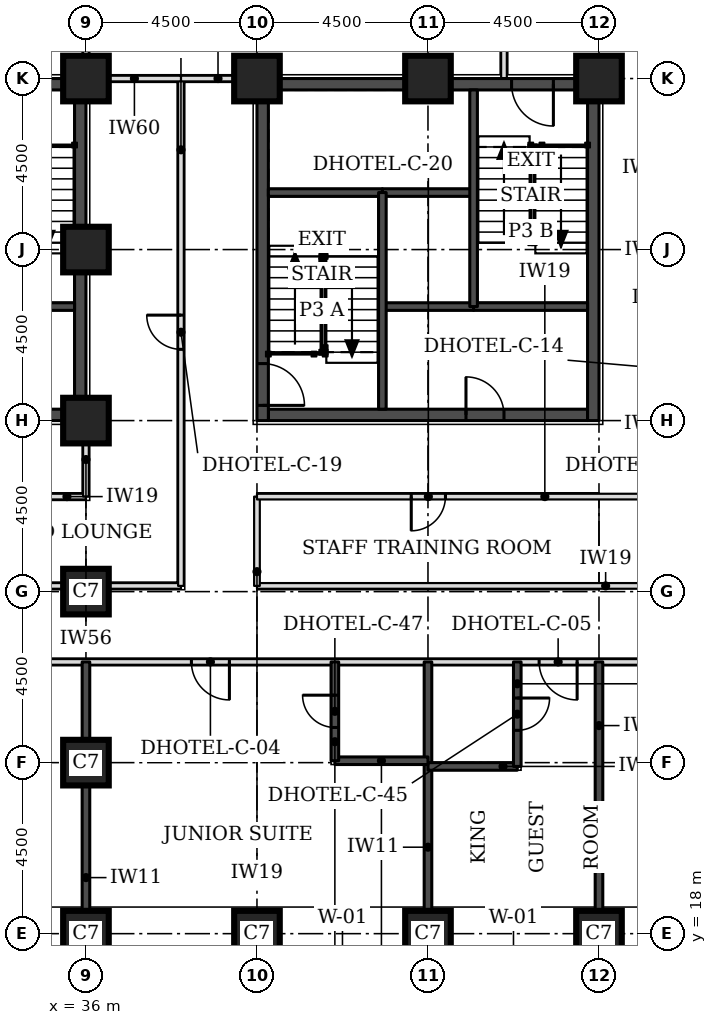
"""IFC4 building model, lengths in metres.
Left out: names, types, materials, properties, quantities, classifications, styles, units other than length and angle.
Written with IfcOpenShell. Run it as: python <this file> out.ifc"""

import sys

from ifc_helpers import new_model, si_unit, direction, frame, frame_2d, origin, origin_2d, place, context, subcontext, project, spatial, rectangle, extrude, element, fill, save


model = new_model("IFC4")
c1 = context("Model", 3, precision=1e-05, world=origin(), true_north=direction((0.0, 1.0)))
c2 = subcontext(c1, "Body", "Model", "MODEL_VIEW")
j1 = project(units=[si_unit("LENGTHUNIT", "METRE"), si_unit("PLANEANGLEUNIT", "RADIAN")], contexts=[c1])
p1 = place(None, origin())
s1 = spatial("IfcSite", under=j1, at=p1, CompositionType="ELEMENT")
p2 = place(p1, origin())
s2 = spatial("IfcBuilding", under=s1, at=p2, CompositionType="ELEMENT")
p3 = place(p2, frame((0.0, 0.0, 56.1)))
s3 = spatial("IfcBuildingStorey", under=s2, at=p3, CompositionType="ELEMENT", Elevation=56.1)
for number, where, z_axis, x_axis in (
    (1, (36.0, 18.0, 0.0), (0.0, 0.0, 1.0), (1.0, 0.0, 0.0)),
    (2, (40.5, 18.0, 0.0), (0.0, 0.0, 1.0), (1.0, 0.0, 0.0)),
    (3, (45.0, 18.0, 0.0), (0.0, 0.0, 1.0), (1.0, 0.0, 0.0)),
    (4, (49.5, 18.0, 0.0), (0.0, 0.0, 1.0), (1.0, 0.0, 0.0)),
    (5, (36.0, 22.5, 0.0), (0.0, 0.0, 1.0), (1.0, 0.0, 0.0)),
    (6, (36.0, 27.0, 0.0), (0.0, 0.0, 1.0), (1.0, 0.0, 0.0)),
    (7, (36.0, 31.5, 0.0), (0.0, 0.0, 1.0), (1.0, 0.0, 0.0)),
    (8, (36.0, 36.0, 0.0), (0.0, 0.0, 1.0), (1.0, 0.0, 0.0)),
    (9, (36.0, 40.5, 0.0), (0.0, 0.0, 1.0), (1.0, 0.0, 0.0)),
    (10, (40.5, 40.5, 0.0), (0.0, 0.0, 1.0), (1.0, 0.0, 0.0)),
    (11, (45.0, 40.5, 0.0), (0.0, 0.0, 1.0), (1.0, 0.0, 0.0)),
    (12, (49.5, 40.5, 0.0), (0.0, 0.0, 1.0), (1.0, 0.0, 0.0)),
):
    element("IfcColumn", number, at=place(p3, frame(where, z_axis=z_axis, x_axis=x_axis)), inside=s3, PredefinedType="COLUMN", context=c2, shape_type="SweptSolid", body=[
        extrude(rectangle(XDim=1.2, YDim=1.2, at=origin_2d()), origin(), (0.0, 0.0, 1.0), 3.3),
    ])
p4 = place(p3, frame((40.8, 31.65, 0.0), z_axis=(0.0, 0.0, 1.0), x_axis=(1.0, 0.0, 0.0)))
e13 = element("IfcWall", 13, at=p4, inside=s3, PredefinedType="SHEAR", context=c2, shape_type="SweptSolid", body=[
    extrude(rectangle(XDim=8.4, YDim=0.3, at=frame_2d((4.2, 0.0))), origin(), (0.0, 0.0, 1.0), 3.3),
])
p5 = place(p4, frame((5.2, 0.0, 0.0)))
e14 = element("IfcOpeningElement", 14, at=p5, cuts=e13, PredefinedType="OPENING", context=c2, shape_type="SweptSolid", body=[
    extrude(rectangle(XDim=1.0, YDim=2.1, at=frame_2d((0.5, 1.05))), frame((0.0, 0.16, 0.0), z_axis=(0.0, -1.0, 0.0), x_axis=(1.0, 0.0, 0.0)), (0.0, 0.0, 1.0), 0.32),
])
p6 = place(p3, frame((40.8, 40.35, 0.0), z_axis=(0.0, 0.0, 1.0), x_axis=(1.0, 0.0, 0.0)))
e15 = element("IfcWall", 15, at=p6, inside=s3, PredefinedType="SHEAR", context=c2, shape_type="SweptSolid", body=[
    extrude(rectangle(XDim=8.4, YDim=0.3, at=frame_2d((4.2, 0.0))), origin(), (0.0, 0.0, 1.0), 3.3),
])
p7 = place(p6, frame((6.4, 0.0, 0.0)))
e16 = element("IfcOpeningElement", 16, at=p7, cuts=e15, PredefinedType="OPENING", context=c2, shape_type="SweptSolid", body=[
    extrude(rectangle(XDim=1.1, YDim=2.1, at=frame_2d((0.55, 1.05))), frame((0.0, 0.16, 0.0), z_axis=(0.0, -1.0, 0.0), x_axis=(1.0, 0.0, 0.0)), (0.0, 0.0, 1.0), 0.32),
])
p8 = place(p3, frame((40.65, 31.5, 0.0), z_axis=(0.0, 0.0, 1.0), x_axis=(0.0, 1.0, 0.0)))
e17 = element("IfcWall", 17, at=p8, inside=s3, PredefinedType="SHEAR", context=c2, shape_type="SweptSolid", body=[
    extrude(rectangle(XDim=9.0, YDim=0.3, at=frame_2d((4.5, 0.0))), origin(), (0.0, 0.0, 1.0), 3.3),
])
p9 = place(p8, frame((0.4, 0.0, 0.0)))
e18 = element("IfcOpeningElement", 18, at=p9, cuts=e17, PredefinedType="OPENING", context=c2, shape_type="SweptSolid", body=[
    extrude(rectangle(XDim=1.1, YDim=2.1, at=frame_2d((0.55, 1.05))), frame((0.0, 0.16, 0.0), z_axis=(0.0, -1.0, 0.0), x_axis=(1.0, 0.0, 0.0)), (0.0, 0.0, 1.0), 0.32),
])
p10 = place(p3, frame((49.35, 31.5, 0.0), z_axis=(0.0, 0.0, 1.0), x_axis=(0.0, 1.0, 0.0)))
e19 = element("IfcWall", 19, at=p10, inside=s3, PredefinedType="SHEAR", context=c2, shape_type="SweptSolid", body=[
    extrude(rectangle(XDim=9.0, YDim=0.3, at=frame_2d((4.5, 0.0))), origin(), (0.0, 0.0, 1.0), 3.3),
])
p11 = place(p3, frame((27.3, 31.65, 0.0), z_axis=(0.0, 0.0, 1.0), x_axis=(1.0, 0.0, 0.0)))
e20 = element("IfcWall", 20, at=p11, inside=s3, PredefinedType="SHEAR", context=c2, shape_type="SweptSolid", body=[
    extrude(rectangle(XDim=8.4, YDim=0.3, at=frame_2d((4.2, 0.0))), origin(), (0.0, 0.0, 1.0), 3.3),
])
p12 = place(p11, frame((4.8, 0.0, 0.0)))
e21 = element("IfcOpeningElement", 21, at=p12, cuts=e20, PredefinedType="OPENING", context=c2, shape_type="SweptSolid", body=[
    extrude(rectangle(XDim=1.8, YDim=2.1, at=frame_2d((0.9, 1.05))), frame((0.0, 0.16, 0.0), z_axis=(0.0, -1.0, 0.0), x_axis=(1.0, 0.0, 0.0)), (0.0, 0.0, 1.0), 0.32),
])
p13 = place(p3, frame((27.3, 40.35, 0.0), z_axis=(0.0, 0.0, 1.0), x_axis=(1.0, 0.0, 0.0)))
e22 = element("IfcWall", 22, at=p13, inside=s3, PredefinedType="SHEAR", context=c2, shape_type="SweptSolid", body=[
    extrude(rectangle(XDim=8.4, YDim=0.3, at=frame_2d((4.2, 0.0))), origin(), (0.0, 0.0, 1.0), 3.3),
])
p14 = place(p13, frame((6.4, 0.0, 0.0)))
e23 = element("IfcOpeningElement", 23, at=p14, cuts=e22, PredefinedType="OPENING", context=c2, shape_type="SweptSolid", body=[
    extrude(rectangle(XDim=1.1, YDim=2.1, at=frame_2d((0.55, 1.05))), frame((0.0, 0.16, 0.0), z_axis=(0.0, -1.0, 0.0), x_axis=(1.0, 0.0, 0.0)), (0.0, 0.0, 1.0), 0.32),
])
p15 = place(p3, frame((35.85, 31.5, 0.0), z_axis=(0.0, 0.0, 1.0), x_axis=(0.0, 1.0, 0.0)))
e24 = element("IfcWall", 24, at=p15, inside=s3, PredefinedType="SHEAR", context=c2, shape_type="SweptSolid", body=[
    extrude(rectangle(XDim=9.0, YDim=0.3, at=frame_2d((4.5, 0.0))), origin(), (0.0, 0.0, 1.0), 3.3),
])
p16 = place(p3, frame((19.15, 25.15, 0.0), z_axis=(0.0, 0.0, 1.0), x_axis=(1.0, 0.0, 0.0)))
e25 = element("IfcWall", 25, at=p16, inside=s3, PredefinedType="PARTITIONING", context=c2, shape_type="SweptSolid", body=[
    extrude(rectangle(XDim=33.7, YDim=0.15, at=frame_2d((16.85, 0.0))), origin(), (0.0, 0.0, 1.0), 3.08),
])
p17 = place(p16, frame((4.175, 0.0, 0.0)))
e26 = element("IfcOpeningElement", 26, at=p17, cuts=e25, PredefinedType="OPENING", context=c2, shape_type="SweptSolid", body=[
    extrude(rectangle(XDim=1.0, YDim=2.1, at=frame_2d((0.5, 1.05))), frame((0.0, 0.085, 0.0), z_axis=(0.0, -1.0, 0.0), x_axis=(1.0, 0.0, 0.0)), (0.0, 0.0, 1.0), 0.17),
])
p18 = place(p16, frame((13.325, 0.0, 0.0)))
e27 = element("IfcOpeningElement", 27, at=p18, cuts=e25, PredefinedType="OPENING", context=c2, shape_type="SweptSolid", body=[
    extrude(rectangle(XDim=1.0, YDim=2.1, at=frame_2d((0.5, 1.05))), frame((0.0, 0.085, 0.0), z_axis=(0.0, -1.0, 0.0), x_axis=(1.0, 0.0, 0.0)), (0.0, 0.0, 1.0), 0.17),
])
p19 = place(p16, frame((19.625, 0.0, 0.0)))
e28 = element("IfcOpeningElement", 28, at=p19, cuts=e25, PredefinedType="OPENING", context=c2, shape_type="SweptSolid", body=[
    extrude(rectangle(XDim=1.0, YDim=2.1, at=frame_2d((0.5, 1.05))), frame((0.0, 0.085, 0.0), z_axis=(0.0, -1.0, 0.0), x_axis=(1.0, 0.0, 0.0)), (0.0, 0.0, 1.0), 0.17),
])
p20 = place(p16, frame((28.775, 0.0, 0.0)))
e29 = element("IfcOpeningElement", 29, at=p20, cuts=e25, PredefinedType="OPENING", context=c2, shape_type="SweptSolid", body=[
    extrude(rectangle(XDim=1.0, YDim=2.1, at=frame_2d((0.5, 1.05))), frame((0.0, 0.085, 0.0), z_axis=(0.0, -1.0, 0.0), x_axis=(1.0, 0.0, 0.0)), (0.0, 0.0, 1.0), 0.17),
])
p21 = place(p16, frame((1.175, 0.0, 0.0)))
e30 = element("IfcOpeningElement", 30, at=p21, cuts=e25, PredefinedType="OPENING", context=c2, shape_type="SweptSolid", body=[
    extrude(rectangle(XDim=1.0, YDim=2.1, at=frame_2d((0.5, 1.05))), frame((0.0, 0.085, 0.0), z_axis=(0.0, -1.0, 0.0), x_axis=(1.0, 0.0, 0.0)), (0.0, 0.0, 1.0), 0.17),
])
p22 = place(p16, frame((31.525, 0.0, 0.0)))
e31 = element("IfcOpeningElement", 31, at=p22, cuts=e25, PredefinedType="OPENING", context=c2, shape_type="SweptSolid", body=[
    extrude(rectangle(XDim=1.0, YDim=2.1, at=frame_2d((0.5, 1.05))), frame((0.0, 0.085, 0.0), z_axis=(0.0, -1.0, 0.0), x_axis=(1.0, 0.0, 0.0)), (0.0, 0.0, 1.0), 0.17),
])
p23 = place(p3, frame((27.0, 27.15, 0.0), z_axis=(0.0, 0.0, 1.0), x_axis=(1.0, 0.0, 0.0)))
e32 = element("IfcWall", 32, at=p23, inside=s3, PredefinedType="PARTITIONING", context=c2, shape_type="SweptSolid", body=[
    extrude(rectangle(XDim=11.5, YDim=0.15, at=frame_2d((5.75, 0.0))), origin(), (0.0, 0.0, 1.0), 3.08),
])
p24 = place(p3, frame((38.5, 27.15, 0.0), z_axis=(0.0, 0.0, 1.0), x_axis=(0.0, 1.0, 0.0)))
e33 = element("IfcWall", 33, at=p24, inside=s3, PredefinedType="PARTITIONING", context=c2, shape_type="SweptSolid", body=[
    extrude(rectangle(XDim=13.35, YDim=0.15, at=frame_2d((6.675, 0.0))), origin(), (0.0, 0.0, 1.0), 3.08),
])
p25 = place(p24, frame((6.225, 0.0, 0.0)))
e34 = element("IfcOpeningElement", 34, at=p25, cuts=e33, PredefinedType="OPENING", context=c2, shape_type="SweptSolid", body=[
    extrude(rectangle(XDim=0.9, YDim=2.1, at=frame_2d((0.45, 1.05))), frame((0.0, 0.085, 0.0), z_axis=(0.0, -1.0, 0.0), x_axis=(1.0, 0.0, 0.0)), (0.0, 0.0, 1.0), 0.17),
])
p26 = place(p3, frame((40.5, 27.15, 0.0), z_axis=(0.0, 0.0, 1.0), x_axis=(1.0, 0.0, 0.0)))
e35 = element("IfcWall", 35, at=p26, inside=s3, PredefinedType="PARTITIONING", context=c2, shape_type="SweptSolid", body=[
    extrude(rectangle(XDim=10.35, YDim=0.15, at=frame_2d((5.175, 0.0))), origin(), (0.0, 0.0, 1.0), 3.08),
])
p27 = place(p3, frame((40.5, 27.15, 0.0), z_axis=(0.0, 0.0, 1.0), x_axis=(0.0, 1.0, 0.0)))
e36 = element("IfcWall", 36, at=p27, inside=s3, PredefinedType="PARTITIONING", context=c2, shape_type="SweptSolid", body=[
    extrude(rectangle(XDim=2.35, YDim=0.15, at=frame_2d((1.175, 0.0))), origin(), (0.0, 0.0, 1.0), 3.08),
])
p28 = place(p3, frame((27.0, 29.5, 0.0), z_axis=(0.0, 0.0, 1.0), x_axis=(1.0, 0.0, 0.0)))
e37 = element("IfcWall", 37, at=p28, inside=s3, PredefinedType="PARTITIONING", context=c2, shape_type="SweptSolid", body=[
    extrude(rectangle(XDim=9.0, YDim=0.15, at=frame_2d((4.5, 0.0))), origin(), (0.0, 0.0, 1.0), 3.08),
])
p29 = place(p3, frame((36.0, 29.5, 0.0), z_axis=(0.0, 0.0, 1.0), x_axis=(0.0, 1.0, 0.0)))
e38 = element("IfcWall", 38, at=p29, inside=s3, PredefinedType="PARTITIONING", context=c2, shape_type="SweptSolid", body=[
    extrude(rectangle(XDim=1.95, YDim=0.15, at=frame_2d((0.975, 0.0))), origin(), (0.0, 0.0, 1.0), 2.33),
])
p30 = place(p3, frame((40.5, 29.5, 0.0), z_axis=(0.0, 0.0, 1.0), x_axis=(1.0, 0.0, 0.0)))
e39 = element("IfcWall", 39, at=p30, inside=s3, PredefinedType="PARTITIONING", context=c2, shape_type="SweptSolid", body=[
    extrude(rectangle(XDim=10.35, YDim=0.15, at=frame_2d((5.175, 0.0))), origin(), (0.0, 0.0, 1.0), 3.08),
])
p31 = place(p30, frame((4.06, 0.0, 0.0)))
e40 = element("IfcOpeningElement", 40, at=p31, cuts=e39, PredefinedType="OPENING", context=c2, shape_type="SweptSolid", body=[
    extrude(rectangle(XDim=0.9, YDim=2.1, at=frame_2d((0.45, 1.05))), frame((0.0, 0.085, 0.0), z_axis=(0.0, -1.0, 0.0), x_axis=(1.0, 0.0, 0.0)), (0.0, 0.0, 1.0), 0.17),
])
p32 = place(p3, frame((38.5, 40.5, 0.0), z_axis=(0.0, 0.0, 1.0), x_axis=(1.0, 0.0, 0.0)))
e41 = element("IfcWall", 41, at=p32, inside=s3, PredefinedType="PARTITIONING", context=c2, shape_type="SweptSolid", body=[
    extrude(rectangle(XDim=1.95, YDim=0.15, at=frame_2d((0.975, 0.0))), origin(), (0.0, 0.0, 1.0), 2.33),
])
p33 = place(p3, frame((36.0, 40.55, 0.0), z_axis=(0.0, 0.0, 1.0), x_axis=(0.0, 1.0, 0.0)))
e42 = element("IfcWall", 42, at=p33, inside=s3, PredefinedType="PARTITIONING", context=c2, shape_type="SweptSolid", body=[
    extrude(rectangle(XDim=4.4, YDim=0.15, at=frame_2d((2.2, 0.0))), origin(), (0.0, 0.0, 1.0), 2.33),
])
p34 = place(p3, frame((47.0, 40.5, 0.0), z_axis=(0.0, 0.0, 1.0), x_axis=(0.0, 1.0, 0.0)))
e43 = element("IfcWall", 43, at=p34, inside=s3, PredefinedType="PARTITIONING", context=c2, shape_type="SweptSolid", body=[
    extrude(rectangle(XDim=7.0, YDim=0.15, at=frame_2d((3.5, 0.0))), origin(), (0.0, 0.0, 1.0), 3.08),
])
p35 = place(p34, frame((3.05, 0.0, 0.0)))
e44 = element("IfcOpeningElement", 44, at=p35, cuts=e43, PredefinedType="OPENING", context=c2, shape_type="SweptSolid", body=[
    extrude(rectangle(XDim=0.9, YDim=2.1, at=frame_2d((0.45, 1.05))), frame((0.0, 0.085, 0.0), z_axis=(0.0, -1.0, 0.0), x_axis=(1.0, 0.0, 0.0)), (0.0, 0.0, 1.0), 0.17),
])
for number, where, z_axis, x_axis in (
    (45, (36.0, 18.6, 0.0), (0.0, 0.0, 1.0), (0.0, 1.0, 0.0)),
    (46, (45.0, 18.6, 0.0), (0.0, 0.0, 1.0), (0.0, 1.0, 0.0)),
    (47, (49.5, 18.6, 0.0), (0.0, 0.0, 1.0), (0.0, 1.0, 0.0)),
):
    element("IfcWall", number, at=place(p3, frame(where, z_axis=z_axis, x_axis=x_axis)), inside=s3, PredefinedType="SOLIDWALL", context=c2, shape_type="SweptSolid", body=[
        extrude(rectangle(XDim=6.55, YDim=0.2, at=frame_2d((3.275, 0.0))), origin(), (0.0, 0.0, 1.0), 3.08),
    ])
p36 = place(p3, frame((45.0, 22.4, 0.0), z_axis=(0.0, 0.0, 1.0), x_axis=(1.0, 0.0, 0.0)))
e48 = element("IfcWall", 48, at=p36, inside=s3, PredefinedType="SOLIDWALL", context=c2, shape_type="SweptSolid", body=[
    extrude(rectangle(XDim=2.35, YDim=0.2, at=frame_2d((1.175, 0.0))), origin(), (0.0, 0.0, 1.0), 3.08),
])
p37 = place(p3, frame((47.35, 22.4, 0.0), z_axis=(0.0, 0.0, 1.0), x_axis=(0.0, 1.0, 0.0)))
e49 = element("IfcWall", 49, at=p37, inside=s3, PredefinedType="SOLIDWALL", context=c2, shape_type="SweptSolid", body=[
    extrude(rectangle(XDim=2.75, YDim=0.2, at=frame_2d((1.375, 0.0))), origin(), (0.0, 0.0, 1.0), 3.08),
])
p38 = place(p37, frame((0.95, 0.0, 0.0)))
e50 = element("IfcOpeningElement", 50, at=p38, cuts=e49, PredefinedType="OPENING", context=c2, shape_type="SweptSolid", body=[
    extrude(rectangle(XDim=0.85, YDim=2.1, at=frame_2d((0.425, 1.05))), frame((0.0, 0.11, 0.0), z_axis=(0.0, -1.0, 0.0), x_axis=(1.0, 0.0, 0.0)), (0.0, 0.0, 1.0), 0.22),
])
p39 = place(p3, frame((42.55, 22.55, 0.0), z_axis=(0.0, 0.0, 1.0), x_axis=(1.0, 0.0, 0.0)))
e51 = element("IfcWall", 51, at=p39, inside=s3, PredefinedType="SOLIDWALL", context=c2, shape_type="SweptSolid", body=[
    extrude(rectangle(XDim=2.45, YDim=0.2, at=frame_2d((1.225, 0.0))), origin(), (0.0, 0.0, 1.0), 3.08),
])
p40 = place(p3, frame((42.55, 22.55, 0.0), z_axis=(0.0, 0.0, 1.0), x_axis=(0.0, 1.0, 0.0)))
e52 = element("IfcWall", 52, at=p40, inside=s3, PredefinedType="SOLIDWALL", context=c2, shape_type="SweptSolid", body=[
    extrude(rectangle(XDim=2.6, YDim=0.2, at=frame_2d((1.3, 0.0))), origin(), (0.0, 0.0, 1.0), 3.08),
])
p41 = place(p40, frame((0.875, 0.0, 0.0)))
e53 = element("IfcOpeningElement", 53, at=p41, cuts=e52, PredefinedType="OPENING", context=c2, shape_type="SweptSolid", body=[
    extrude(rectangle(XDim=0.85, YDim=2.1, at=frame_2d((0.425, 1.05))), frame((0.0, 0.11, 0.0), z_axis=(0.0, -1.0, 0.0), x_axis=(1.0, 0.0, 0.0)), (0.0, 0.0, 1.0), 0.22),
])
p42 = place(p3, frame((36.05, 40.5, 0.0), z_axis=(0.0, 0.0, 1.0), x_axis=(1.0, 0.0, 0.0)))
e54 = element("IfcWall", 54, at=p42, inside=s3, PredefinedType="PARTITIONING", context=c2, shape_type="SweptSolid", body=[
    extrude(rectangle(XDim=2.45, YDim=0.15, at=frame_2d((1.225, 0.0))), origin(), (0.0, 0.0, 1.0), 2.33),
])
p43 = place(p3, frame((43.8, 34.5, 0.0), z_axis=(0.0, 0.0, 1.0), x_axis=(1.0, 0.0, 0.0)))
e55 = element("IfcWall", 55, at=p43, inside=s3, PredefinedType="SOLIDWALL", context=c2, shape_type="SweptSolid", body=[
    extrude(rectangle(XDim=2.4, YDim=0.2, at=frame_2d((1.2, 0.0))), origin(), (0.0, 0.0, 1.0), 3.08),
])
p44 = place(p3, frame((46.2, 34.5, 0.0), z_axis=(0.0, 0.0, 1.0), x_axis=(1.0, 0.0, 0.0)))
e56 = element("IfcWall", 56, at=p44, inside=s3, PredefinedType="SOLIDWALL", context=c2, shape_type="SweptSolid", body=[
    extrude(rectangle(XDim=3.0, YDim=0.2, at=frame_2d((1.5, 0.0))), origin(), (0.0, 0.0, 1.0), 3.08),
])
p45 = place(p3, frame((43.8, 37.5, 0.0), z_axis=(0.0, 0.0, 1.0), x_axis=(1.0, 0.0, 0.0)))
e57 = element("IfcWall", 57, at=p45, inside=s3, PredefinedType="SOLIDWALL", context=c2, shape_type="SweptSolid", body=[
    extrude(rectangle(XDim=2.4, YDim=0.2, at=frame_2d((1.2, 0.0))), origin(), (0.0, 0.0, 1.0), 3.3),
])
p46 = place(p3, frame((40.8, 37.5, 0.0), z_axis=(0.0, 0.0, 1.0), x_axis=(1.0, 0.0, 0.0)))
e58 = element("IfcWall", 58, at=p46, inside=s3, PredefinedType="SOLIDWALL", context=c2, shape_type="SweptSolid", body=[
    extrude(rectangle(XDim=3.0, YDim=0.2, at=frame_2d((1.5, 0.0))), origin(), (0.0, 0.0, 1.0), 3.08),
])
for number, where, z_axis, x_axis in (
    (59, (43.8, 31.8, 0.0), (0.0, 0.0, 1.0), (0.0, 1.0, 0.0)),
    (60, (46.2, 34.5, 0.0), (0.0, 0.0, 1.0), (0.0, 1.0, 0.0)),
):
    element("IfcWall", number, at=place(p3, frame(where, z_axis=z_axis, x_axis=x_axis)), inside=s3, PredefinedType="SOLIDWALL", context=c2, shape_type="SweptSolid", body=[
        extrude(rectangle(XDim=5.7, YDim=0.2, at=frame_2d((2.85, 0.0))), origin(), (0.0, 0.0, 1.0), 3.08),
    ])
p47 = place(p3, frame((30.3, 34.5, 0.0), z_axis=(0.0, 0.0, 1.0), x_axis=(1.0, 0.0, 0.0)))
e61 = element("IfcWall", 61, at=p47, inside=s3, PredefinedType="SOLIDWALL", context=c2, shape_type="SweptSolid", body=[
    extrude(rectangle(XDim=5.4, YDim=0.2, at=frame_2d((2.7, 0.0))), origin(), (0.0, 0.0, 1.0), 3.08),
])
p48 = place(p47, frame((0.45, 0.0, 0.0)))
e62 = element("IfcOpeningElement", 62, at=p48, cuts=e61, PredefinedType="OPENING", context=c2, shape_type="SweptSolid", body=[
    extrude(rectangle(XDim=1.5, YDim=2.1, at=frame_2d((0.75, 1.05))), frame((0.0, 0.11, 0.0), z_axis=(0.0, -1.0, 0.0), x_axis=(1.0, 0.0, 0.0)), (0.0, 0.0, 1.0), 0.22),
])
p49 = place(p19, frame((1.0, 0.0, 0.0), z_axis=(0.0, 0.0, 1.0), x_axis=(-1.0, 0.0, 0.0)))
e63 = element("IfcDoor", 63, at=p49, inside=s3, OperationType="SINGLE_SWING_LEFT", PredefinedType="DOOR", context=c2, shape_type="SweptSolid", body=[
    extrude(rectangle(XDim=1.0, YDim=2.1, at=frame_2d((0.5, 1.05))), frame((0.0, 0.025, 0.0), z_axis=(0.0, -1.0, 0.0), x_axis=(1.0, 0.0, 0.0)), (0.0, 0.0, 1.0), 0.05),
])
fill(e28, e63)
p50 = place(p41, origin())
e64 = element("IfcDoor", 64, at=p50, inside=s3, OperationType="SINGLE_SWING_RIGHT", PredefinedType="DOOR", context=c2, shape_type="SweptSolid", body=[
    extrude(rectangle(XDim=0.85, YDim=2.1, at=frame_2d((0.425, 1.05))), frame((0.0, 0.025, 0.0), z_axis=(0.0, -1.0, 0.0), x_axis=(1.0, 0.0, 0.0)), (0.0, 0.0, 1.0), 0.05),
])
fill(e53, e64)
p51 = place(p20, frame((1.0, 0.0, 0.0), z_axis=(0.0, 0.0, 1.0), x_axis=(-1.0, 0.0, 0.0)))
e65 = element("IfcDoor", 65, at=p51, inside=s3, OperationType="SINGLE_SWING_LEFT", PredefinedType="DOOR", context=c2, shape_type="SweptSolid", body=[
    extrude(rectangle(XDim=1.0, YDim=2.1, at=frame_2d((0.5, 1.05))), frame((0.0, 0.025, 0.0), z_axis=(0.0, -1.0, 0.0), x_axis=(1.0, 0.0, 0.0)), (0.0, 0.0, 1.0), 0.05),
])
fill(e29, e65)
p52 = place(p38, frame((0.85, 0.0, 0.0), z_axis=(0.0, 0.0, 1.0), x_axis=(-1.0, 0.0, 0.0)))
e66 = element("IfcDoor", 66, at=p52, inside=s3, OperationType="SINGLE_SWING_LEFT", PredefinedType="DOOR", context=c2, shape_type="SweptSolid", body=[
    extrude(rectangle(XDim=0.85, YDim=2.1, at=frame_2d((0.425, 1.05))), frame((0.0, 0.025, 0.0), z_axis=(0.0, -1.0, 0.0), x_axis=(1.0, 0.0, 0.0)), (0.0, 0.0, 1.0), 0.05),
])
fill(e50, e66)
p53 = place(p25, origin())
e67 = element("IfcDoor", 67, at=p53, inside=s3, OperationType="SINGLE_SWING_RIGHT", PredefinedType="DOOR", context=c2, shape_type="SweptSolid", body=[
    extrude(rectangle(XDim=0.9, YDim=2.1, at=frame_2d((0.45, 1.05))), frame((0.0, 0.025, 0.0), z_axis=(0.0, -1.0, 0.0), x_axis=(1.0, 0.0, 0.0)), (0.0, 0.0, 1.0), 0.05),
])
fill(e34, e67)
p54 = place(p31, frame((0.9, 0.0, 0.0), z_axis=(0.0, 0.0, 1.0), x_axis=(-1.0, 0.0, 0.0)))
e68 = element("IfcDoor", 68, at=p54, inside=s3, OperationType="SINGLE_SWING_RIGHT", PredefinedType="DOOR", context=c2, shape_type="SweptSolid", body=[
    extrude(rectangle(XDim=0.9, YDim=2.1, at=frame_2d((0.45, 1.05))), frame((0.0, 0.025, 0.0), z_axis=(0.0, -1.0, 0.0), x_axis=(1.0, 0.0, 0.0)), (0.0, 0.0, 1.0), 0.05),
])
fill(e40, e68)
p55 = place(p9, frame((1.1, 0.0, 0.0), z_axis=(0.0, 0.0, 1.0), x_axis=(-1.0, 0.0, 0.0)))
e69 = element("IfcDoor", 69, at=p55, inside=s3, OperationType="SINGLE_SWING_RIGHT", PredefinedType="DOOR", context=c2, shape_type="SweptSolid", body=[
    extrude(rectangle(XDim=1.1, YDim=2.1, at=frame_2d((0.55, 1.05))), frame((0.0, 0.025, 0.0), z_axis=(0.0, -1.0, 0.0), x_axis=(1.0, 0.0, 0.0)), (0.0, 0.0, 1.0), 0.05),
])
fill(e18, e69)
p56 = place(p7, frame((1.1, 0.0, 0.0), z_axis=(0.0, 0.0, 1.0), x_axis=(-1.0, 0.0, 0.0)))
e70 = element("IfcDoor", 70, at=p56, inside=s3, OperationType="SINGLE_SWING_LEFT", PredefinedType="DOOR", context=c2, shape_type="SweptSolid", body=[
    extrude(rectangle(XDim=1.1, YDim=2.1, at=frame_2d((0.55, 1.05))), frame((0.0, 0.025, 0.0), z_axis=(0.0, -1.0, 0.0), x_axis=(1.0, 0.0, 0.0)), (0.0, 0.0, 1.0), 0.05),
])
fill(e16, e70)
p57 = place(p5, origin())
e71 = element("IfcDoor", 71, at=p57, inside=s3, OperationType="SINGLE_SWING_LEFT", PredefinedType="DOOR", context=c2, shape_type="SweptSolid", body=[
    extrude(rectangle(XDim=1.0, YDim=2.1, at=frame_2d((0.5, 1.05))), frame((0.0, 0.025, 0.0), z_axis=(0.0, -1.0, 0.0), x_axis=(1.0, 0.0, 0.0)), (0.0, 0.0, 1.0), 0.05),
])
fill(e14, e71)
save(model, sys.argv[1])
